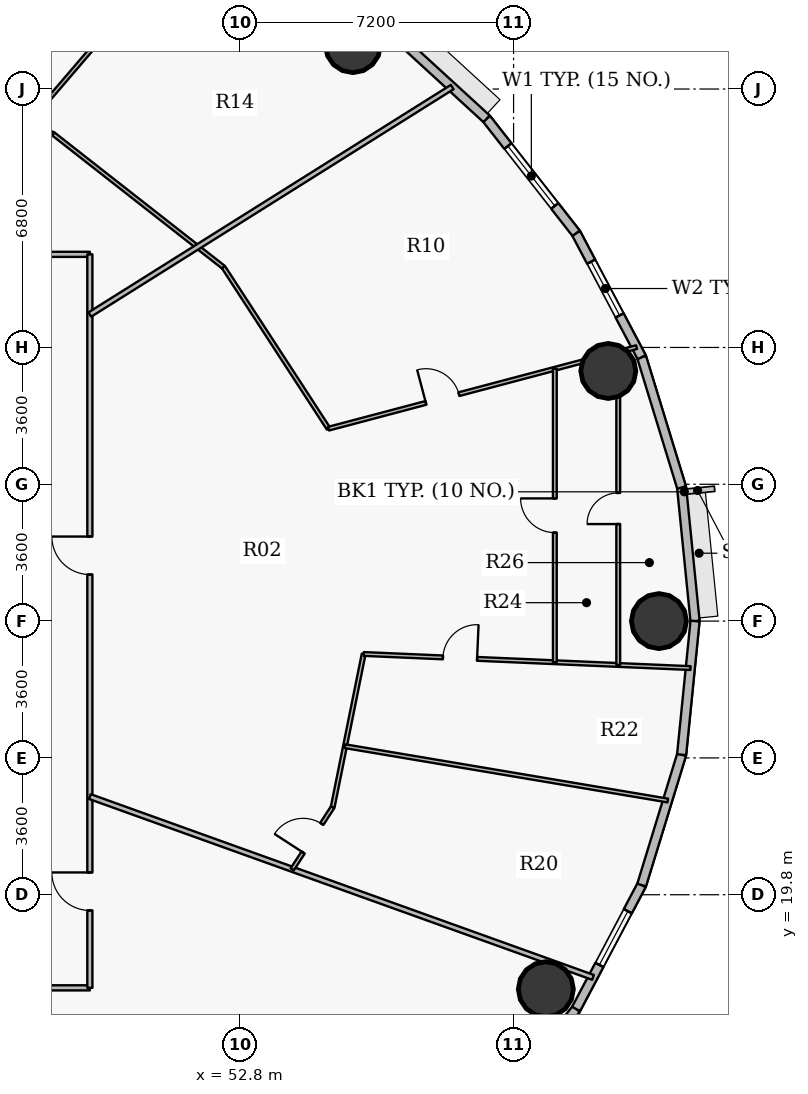
"""IFC4 building model, lengths in metres.
Left out: names, types, materials, properties, quantities, classifications, styles, units other than length and angle.
Written with IfcOpenShell. Run it as: python <this file> out.ifc"""

import sys

from ifc_helpers import new_model, si_unit, direction, frame, frame_2d, origin, origin_2d, place, context, subcontext, project, spatial, rectangle, hollow_circle, extrude, source, transform, mapped, element, fill, save


model = new_model("IFC4")
c1 = context("Model", 3, precision=1e-05, world=origin(), true_north=direction((0.0, 1.0)))
c2 = subcontext(c1, "Body", "Model", "MODEL_VIEW")
j1 = project(units=[si_unit("LENGTHUNIT", "METRE"), si_unit("PLANEANGLEUNIT", "RADIAN")], contexts=[c1])
p1 = place(None, origin())
s1 = spatial("IfcSite", under=j1, at=p1, CompositionType="ELEMENT")
p2 = place(p1, origin())
s2 = spatial("IfcBuilding", under=s1, at=p2, CompositionType="ELEMENT")
p3 = place(p2, frame((0.0, 0.0, 119.7)))
s3 = spatial("IfcBuildingStorey", under=s2, at=p3, CompositionType="ELEMENT", Elevation=119.7)
for number, where, z_axis, x_axis in (
    (1, (63.825, 27.0, 0.0), (0.0, 0.0, 1.0), (1.0, 0.0, 0.0)),
    (2, (62.493, 33.581, 0.0), (0.0, 0.0, 1.0), (1.0, 0.0, 0.0)),
    (3, (55.773, 42.156, 0.0), (0.0, 0.0, 1.0), (1.0, 0.0, 0.0)),
    (4, (60.849, 17.312, 0.0), (0.0, 0.0, 1.0), (1.0, 0.0, 0.0)),
):
    element("IfcColumn", number, at=place(p3, frame(where, z_axis=z_axis, x_axis=x_axis)), inside=s3, PredefinedType="COLUMN", context=c2, shape_type="SweptSolid", body=[
        extrude(hollow_circle(Radius=0.725, WallThickness=0.042, at=origin_2d()), origin(), (0.0, 0.0, 1.0), 3.75),
    ])
p4 = place(p3, frame((64.422, 30.515, 0.0), z_axis=(0.0, 0.0, 1.0), x_axis=(0.099989468229, -0.994988495533, 0.0)))
e5 = element("IfcWall", 5, at=p4, inside=s3, PredefinedType="SOLIDWALL", context=c2, shape_type="SweptSolid", body=[
    extrude(rectangle(XDim=3.533, YDim=0.24, at=frame_2d((1.767, 0.0))), origin(), (0.0, 0.0, 1.0), 3.5),
])
p5 = place(p3, frame((63.37, 33.945, 0.0), z_axis=(0.0, 0.0, 1.0), x_axis=(0.293124431344, -0.956074300329, 0.0)))
e6 = element("IfcWall", 6, at=p5, inside=s3, PredefinedType="SOLIDWALL", context=c2, shape_type="SweptSolid", body=[
    extrude(rectangle(XDim=3.587, YDim=0.24, at=frame_2d((1.793, 0.0))), origin(), (0.0, 0.0, 1.0), 3.5),
])
p6 = place(p3, frame((61.645, 37.206, 0.0), z_axis=(0.0, 0.0, 1.0), x_axis=(0.467614004126, -0.883932770716, 0.0)))
e7 = element("IfcWall", 7, at=p6, inside=s3, PredefinedType="SOLIDWALL", context=c2, shape_type="SweptSolid", body=[
    extrude(rectangle(XDim=3.689, YDim=0.24, at=frame_2d((1.844, 0.0))), origin(), (0.0, 0.0, 1.0), 3.5),
])
p7 = place(p6, frame((0.846, 0.0, 0.9)))
e8 = element("IfcOpeningElement", 8, at=p7, cuts=e7, PredefinedType="OPENING", context=c2, shape_type="SweptSolid", body=[
    extrude(rectangle(XDim=1.6, YDim=1.75, at=origin_2d()), frame((0.8, 0.13, 0.875), z_axis=(0.0, -1.0, 0.0), x_axis=(1.0, 0.0, 0.0)), (0.0, 0.0, 1.0), 0.26),
])
p8 = place(p3, frame((59.289, 40.217, 0.0), z_axis=(0.0, 0.0, 1.0), x_axis=(0.616272103517, -0.787533297345, 0.0)))
e9 = element("IfcWall", 9, at=p8, inside=s3, PredefinedType="SOLIDWALL", context=c2, shape_type="SweptSolid", body=[
    extrude(rectangle(XDim=3.823, YDim=0.24, at=frame_2d((1.912, 0.0))), origin(), (0.0, 0.0, 1.0), 3.5),
])
p9 = place(p8, frame((0.912, 0.0, 0.9)))
e10 = element("IfcOpeningElement", 10, at=p9, cuts=e9, PredefinedType="OPENING", context=c2, shape_type="SweptSolid", body=[
    extrude(rectangle(XDim=2.0, YDim=1.75, at=origin_2d()), frame((1.0, 0.13, 0.875), z_axis=(0.0, -1.0, 0.0), x_axis=(1.0, 0.0, 0.0)), (0.0, 0.0, 1.0), 0.26),
])
p10 = place(p3, frame((56.358, 42.903, 0.0), z_axis=(0.0, 0.0, 1.0), x_axis=(0.737113356241, -0.675769117414, 0.0)))
e11 = element("IfcWall", 11, at=p10, inside=s3, PredefinedType="SOLIDWALL", context=c2, shape_type="SweptSolid", body=[
    extrude(rectangle(XDim=3.976, YDim=0.24, at=frame_2d((1.988, 0.0))), origin(), (0.0, 0.0, 1.0), 3.5),
])
p11 = place(p3, frame((61.645, 16.794, 0.0), z_axis=(0.0, 0.0, 1.0), x_axis=(-0.616272103517, -0.787533297345, 0.0)))
e12 = element("IfcWall", 12, at=p11, inside=s3, PredefinedType="SOLIDWALL", context=c2, shape_type="SweptSolid", body=[
    extrude(rectangle(XDim=3.823, YDim=0.24, at=frame_2d((1.912, 0.0))), origin(), (0.0, 0.0, 1.0), 3.5),
])
p12 = place(p3, frame((63.37, 20.055, 0.0), z_axis=(0.0, 0.0, 1.0), x_axis=(-0.467614004126, -0.883932770716, 0.0)))
e13 = element("IfcWall", 13, at=p12, inside=s3, PredefinedType="SOLIDWALL", context=c2, shape_type="SweptSolid", body=[
    extrude(rectangle(XDim=3.689, YDim=0.24, at=frame_2d((1.844, 0.0))), origin(), (0.0, 0.0, 1.0), 3.5),
])
p13 = place(p12, frame((0.778, 0.0, 0.9)))
e14 = element("IfcOpeningElement", 14, at=p13, cuts=e13, PredefinedType="OPENING", context=c2, shape_type="SweptSolid", body=[
    extrude(rectangle(XDim=1.6, YDim=1.75, at=origin_2d()), frame((0.8, 0.13, 0.875), z_axis=(0.0, -1.0, 0.0), x_axis=(1.0, 0.0, 0.0)), (0.0, 0.0, 1.0), 0.26),
])
p14 = place(p3, frame((64.422, 23.485, 0.0), z_axis=(0.0, 0.0, 1.0), x_axis=(-0.293124431344, -0.956074300329, 0.0)))
e15 = element("IfcWall", 15, at=p14, inside=s3, PredefinedType="SOLIDWALL", context=c2, shape_type="SweptSolid", body=[
    extrude(rectangle(XDim=3.587, YDim=0.24, at=frame_2d((1.793, 0.0))), origin(), (0.0, 0.0, 1.0), 3.5),
])
p15 = place(p3, frame((64.775, 27.0, 0.0), z_axis=(0.0, 0.0, 1.0), x_axis=(-0.099989468229, -0.994988495533, 0.0)))
e16 = element("IfcWall", 16, at=p15, inside=s3, PredefinedType="SOLIDWALL", context=c2, shape_type="SweptSolid", body=[
    extrude(rectangle(XDim=3.533, YDim=0.24, at=frame_2d((1.767, 0.0))), origin(), (0.0, 0.0, 1.0), 3.5),
])
p16 = place(p3, frame((35.584, 17.35, 0.0), z_axis=(0.0, 0.0, 1.0), x_axis=(1.0, 0.0, 0.0)))
e17 = element("IfcWall", 17, at=p16, inside=s3, PredefinedType="PARTITIONING", context=c2, shape_type="SweptSolid", body=[
    extrude(rectangle(XDim=13.266, YDim=0.135, at=frame_2d((6.633, 0.0))), origin(), (0.0, 0.0, 1.0), 2.935),
])
p17 = place(p16, frame((2.757, 0.0, 0.0)))
e18 = element("IfcOpeningElement", 18, at=p17, cuts=e17, PredefinedType="OPENING", context=c2, shape_type="SweptSolid", body=[
    extrude(rectangle(XDim=1.0, YDim=2.15, at=origin_2d()), frame((0.5, 0.078, 1.075), z_axis=(0.0, -1.0, 0.0), x_axis=(1.0, 0.0, 0.0)), (0.0, 0.0, 1.0), 0.155),
])
p18 = place(p3, frame((38.477, 36.65, 0.0), z_axis=(0.0, 0.0, 1.0), x_axis=(1.0, 0.0, 0.0)))
e19 = element("IfcWall", 19, at=p18, inside=s3, PredefinedType="PARTITIONING", context=c2, shape_type="SweptSolid", body=[
    extrude(rectangle(XDim=10.373, YDim=0.135, at=frame_2d((5.187, 0.0))), origin(), (0.0, 0.0, 1.0), 2.935),
])
p19 = place(p18, frame((5.621, 0.0, 0.0)))
e20 = element("IfcOpeningElement", 20, at=p19, cuts=e19, PredefinedType="OPENING", context=c2, shape_type="SweptSolid", body=[
    extrude(rectangle(XDim=1.0, YDim=2.15, at=origin_2d()), frame((0.5, 0.078, 1.075), z_axis=(0.0, -1.0, 0.0), x_axis=(1.0, 0.0, 0.0)), (0.0, 0.0, 1.0), 0.155),
])
p20 = place(p3, frame((42.058, 17.35, 0.0), z_axis=(0.0, 0.0, 1.0), x_axis=(0.531660079213, -0.846957826678, 0.0)))
e21 = element("IfcWall", 21, at=p20, inside=s3, PredefinedType="PARTITIONING", context=c2, shape_type="SweptSolid", body=[
    extrude(rectangle(XDim=12.437, YDim=0.135, at=frame_2d((6.219, 0.0))), origin(), (0.0, 0.0, 1.0), 2.935),
])
p21 = place(p3, frame((47.212, 40.087, 0.0), z_axis=(0.0, 0.0, 1.0), x_axis=(0.928752817467, -0.370699614307, 0.0)))
e22 = element("IfcWall", 22, at=p21, inside=s3, PredefinedType="PARTITIONING", context=c2, shape_type="SweptSolid", body=[
    extrude(rectangle(XDim=0.731, YDim=0.1, at=frame_2d((0.365, 0.0))), origin(), (0.0, 0.0, 1.0), 3.035),
])
p22 = place(p3, frame((47.212, 40.087, 0.0), z_axis=(0.0, 0.0, 1.0), x_axis=(0.650621399292, 0.759402261508, 0.0)))
e23 = element("IfcWall", 23, at=p22, inside=s3, PredefinedType="PARTITIONING", context=c2, shape_type="SweptSolid", body=[
    extrude(rectangle(XDim=7.334, YDim=0.1, at=frame_2d((3.667, 0.0))), origin(), (0.0, 0.0, 1.0), 2.935),
])
p23 = place(p22, frame((3.217, 0.0, 0.0)))
e24 = element("IfcOpeningElement", 24, at=p23, cuts=e23, PredefinedType="OPENING", context=c2, shape_type="SweptSolid", body=[
    extrude(rectangle(XDim=0.9, YDim=2.1, at=origin_2d()), frame((0.45, 0.06, 1.05), z_axis=(0.0, -1.0, 0.0), x_axis=(1.0, 0.0, 0.0)), (0.0, 0.0, 1.0), 0.12),
])
p24 = place(p3, frame((47.891, 39.816, 0.0), z_axis=(0.0, 0.0, 1.0), x_axis=(0.787338202739, -0.616521333376, 0.0)))
e25 = element("IfcWall", 25, at=p24, inside=s3, PredefinedType="PARTITIONING", context=c2, shape_type="SweptSolid", body=[
    extrude(rectangle(XDim=5.684, YDim=0.1, at=frame_2d((2.842, 0.0))), origin(), (0.0, 0.0, 1.0), 2.935),
])
p25 = place(p3, frame((48.85, 17.35, 0.0), z_axis=(0.0, 0.0, 1.0), x_axis=(0.0, 1.0, 0.0)))
e26 = element("IfcWall", 26, at=p25, inside=s3, PredefinedType="PARTITIONING", context=c2, shape_type="SweptSolid", body=[
    extrude(rectangle(XDim=19.3, YDim=0.135, at=frame_2d((9.65, 0.0))), origin(), (0.0, 0.0, 1.0), 2.935),
])
p26 = place(p25, frame((2.036, 0.0, 0.0)))
e27 = element("IfcOpeningElement", 27, at=p26, cuts=e26, PredefinedType="OPENING", context=c2, shape_type="SweptSolid", body=[
    extrude(rectangle(XDim=1.0, YDim=2.15, at=origin_2d()), frame((0.5, 0.078, 1.075), z_axis=(0.0, -1.0, 0.0), x_axis=(1.0, 0.0, 0.0)), (0.0, 0.0, 1.0), 0.155),
])
p27 = place(p25, frame((10.875, 0.0, 0.0)))
e28 = element("IfcOpeningElement", 28, at=p27, cuts=e26, PredefinedType="OPENING", context=c2, shape_type="SweptSolid", body=[
    extrude(rectangle(XDim=1.0, YDim=2.15, at=origin_2d()), frame((0.5, 0.078, 1.075), z_axis=(0.0, -1.0, 0.0), x_axis=(1.0, 0.0, 0.0)), (0.0, 0.0, 1.0), 0.155),
])
p28 = place(p3, frame((48.85, 22.383, 0.0), z_axis=(0.0, 0.0, 1.0), x_axis=(0.941089213164, -0.338158384292, 0.0)))
e29 = element("IfcWall", 29, at=p28, inside=s3, PredefinedType="PARTITIONING", context=c2, shape_type="SweptSolid", body=[
    extrude(rectangle(XDim=14.069, YDim=0.135, at=frame_2d((7.035, 0.0))), origin(), (0.0, 0.0, 1.0), 2.935),
])
p29 = place(p3, frame((48.85, 35.066, 0.0), z_axis=(0.0, 0.0, 1.0), x_axis=(0.846963568038, 0.531650932866, 0.0)))
e30 = element("IfcWall", 30, at=p29, inside=s3, PredefinedType="PARTITIONING", context=c2, shape_type="SweptSolid", body=[
    extrude(rectangle(XDim=11.258, YDim=0.135, at=frame_2d((5.629, 0.0))), origin(), (0.0, 0.0, 1.0), 2.935),
])
p30 = place(p3, frame((52.366, 36.311, 0.0), z_axis=(0.0, 0.0, 1.0), x_axis=(0.545394651961, -0.838179380331, 0.0)))
e31 = element("IfcWall", 31, at=p30, inside=s3, PredefinedType="PARTITIONING", context=c2, shape_type="SweptSolid", body=[
    extrude(rectangle(XDim=5.068, YDim=0.1, at=frame_2d((2.534, 0.0))), origin(), (0.0, 0.0, 1.0), 3.5),
])
p31 = place(p3, frame((54.176, 20.469, 0.0), z_axis=(0.0, 0.0, 1.0), x_axis=(0.545370803514, 0.838194897786, 0.0)))
e32 = element("IfcWall", 32, at=p31, inside=s3, PredefinedType="PARTITIONING", context=c2, shape_type="SweptSolid", body=[
    extrude(rectangle(XDim=1.952, YDim=0.1, at=frame_2d((0.976, 0.0))), origin(), (0.0, 0.0, 1.0), 3.5),
])
p32 = place(p31, frame((0.526, 0.0, 0.0)))
e33 = element("IfcOpeningElement", 33, at=p32, cuts=e32, PredefinedType="OPENING", context=c2, shape_type="SweptSolid", body=[
    extrude(rectangle(XDim=0.9, YDim=2.1, at=origin_2d()), frame((0.45, 0.06, 1.05), z_axis=(0.0, -1.0, 0.0), x_axis=(1.0, 0.0, 0.0)), (0.0, 0.0, 1.0), 0.12),
])
p33 = place(p3, frame((55.131, 32.063, 0.0), z_axis=(0.0, 0.0, 1.0), x_axis=(0.96671793708, 0.255844542893, 0.0)))
e34 = element("IfcWall", 34, at=p33, inside=s3, PredefinedType="PARTITIONING", context=c2, shape_type="SweptSolid", body=[
    extrude(rectangle(XDim=8.385, YDim=0.1, at=frame_2d((4.192, 0.0))), origin(), (0.0, 0.0, 1.0), 2.935),
])
p34 = place(p33, frame((2.65, 0.0, 0.0)))
e35 = element("IfcOpeningElement", 35, at=p34, cuts=e34, PredefinedType="OPENING", context=c2, shape_type="SweptSolid", body=[
    extrude(rectangle(XDim=0.9, YDim=2.1, at=origin_2d()), frame((0.45, 0.06, 1.05), z_axis=(0.0, -1.0, 0.0), x_axis=(1.0, 0.0, 0.0)), (0.0, 0.0, 1.0), 0.12),
])
p35 = place(p3, frame((55.24, 22.105, 0.0), z_axis=(0.0, 0.0, 1.0), x_axis=(0.198205355444, 0.980160515973, 0.0)))
e36 = element("IfcWall", 36, at=p35, inside=s3, PredefinedType="PARTITIONING", context=c2, shape_type="SweptSolid", body=[
    extrude(rectangle(XDim=4.112, YDim=0.1, at=frame_2d((2.056, 0.0))), origin(), (0.0, 0.0, 1.0), 3.5),
])
p36 = place(p3, frame((55.564, 23.708, 0.0), z_axis=(0.0, 0.0, 1.0), x_axis=(0.986139151265, -0.165920385556, 0.0)))
e37 = element("IfcWall", 37, at=p36, inside=s3, PredefinedType="PARTITIONING", context=c2, shape_type="SweptSolid", body=[
    extrude(rectangle(XDim=8.612, YDim=0.1, at=frame_2d((4.306, 0.0))), origin(), (0.0, 0.0, 1.0), 2.935),
])
p37 = place(p3, frame((56.055, 26.135, 0.0), z_axis=(0.0, 0.0, 1.0), x_axis=(0.999070497197, -0.043106166957, 0.0)))
e38 = element("IfcWall", 38, at=p37, inside=s3, PredefinedType="PARTITIONING", context=c2, shape_type="SweptSolid", body=[
    extrude(rectangle(XDim=8.609, YDim=0.1, at=frame_2d((4.304, 0.0))), origin(), (0.0, 0.0, 1.0), 2.935),
])
p38 = place(p37, frame((2.088, 0.0, 0.0)))
e39 = element("IfcOpeningElement", 39, at=p38, cuts=e38, PredefinedType="OPENING", context=c2, shape_type="SweptSolid", body=[
    extrude(rectangle(XDim=0.9, YDim=2.1, at=origin_2d()), frame((0.45, 0.06, 1.05), z_axis=(0.0, -1.0, 0.0), x_axis=(1.0, 0.0, 0.0)), (0.0, 0.0, 1.0), 0.12),
])
p39 = place(p3, frame((61.085, 25.918, 0.0), z_axis=(0.0, 0.0, 1.0), x_axis=(0.0, 1.0, 0.0)))
e40 = element("IfcWall", 40, at=p39, inside=s3, PredefinedType="PARTITIONING", context=c2, shape_type="SweptSolid", body=[
    extrude(rectangle(XDim=7.721, YDim=0.1, at=frame_2d((3.861, 0.0))), origin(), (0.0, 0.0, 1.0), 2.935),
])
p40 = place(p39, frame((3.411, 0.0, 0.0)))
e41 = element("IfcOpeningElement", 41, at=p40, cuts=e40, PredefinedType="OPENING", context=c2, shape_type="SweptSolid", body=[
    extrude(rectangle(XDim=0.9, YDim=2.1, at=origin_2d()), frame((0.45, 0.06, 1.05), z_axis=(0.0, -1.0, 0.0), x_axis=(1.0, 0.0, 0.0)), (0.0, 0.0, 1.0), 0.12),
])
p41 = place(p3, frame((62.754, 25.846, 0.0), z_axis=(0.0, 0.0, 1.0), x_axis=(0.0, 1.0, 0.0)))
e42 = element("IfcWall", 42, at=p41, inside=s3, PredefinedType="PARTITIONING", context=c2, shape_type="SweptSolid", body=[
    extrude(rectangle(XDim=8.235, YDim=0.1, at=frame_2d((4.117, 0.0))), origin(), (0.0, 0.0, 1.0), 2.935),
])
p42 = place(p41, frame((3.708, 0.0, 0.0)))
e43 = element("IfcOpeningElement", 43, at=p42, cuts=e42, PredefinedType="OPENING", context=c2, shape_type="SweptSolid", body=[
    extrude(rectangle(XDim=0.82, YDim=2.1, at=origin_2d()), frame((0.41, 0.06, 1.05), z_axis=(0.0, -1.0, 0.0), x_axis=(1.0, 0.0, 0.0)), (0.0, 0.0, 1.0), 0.12),
])
m1 = source(origin(), c2, "Body", "SweptSolid", [
    extrude(rectangle(XDim=1.6, YDim=1.75, at=origin_2d()), frame((0.8, 0.03, 0.875), z_axis=(0.0, -1.0, 0.0), x_axis=(1.0, 0.0, 0.0)), (0.0, 0.0, 1.0), 0.06),
])
p43 = place(p7, origin())
e44 = element("IfcWindow", 44, at=p43, inside=s3, PartitioningType="DOUBLE_PANEL_VERTICAL", PredefinedType="WINDOW", context=c2, shape_type="MappedRepresentation", body=[
    mapped(m1, transform((0.0, 0.0, 0.0), x_axis=(1.0, 0.0, 0.0), y_axis=(0.0, 1.0, 0.0), z_axis=(0.0, 0.0, 1.0), scale=1.0)),
])
fill(e8, e44)
m2 = source(origin(), c2, "Body", "SweptSolid", [
    extrude(rectangle(XDim=2.0, YDim=1.75, at=origin_2d()), frame((1.0, 0.03, 0.875), z_axis=(0.0, -1.0, 0.0), x_axis=(1.0, 0.0, 0.0)), (0.0, 0.0, 1.0), 0.06),
])
p44 = place(p9, origin())
e45 = element("IfcWindow", 45, at=p44, inside=s3, PartitioningType="DOUBLE_PANEL_VERTICAL", PredefinedType="WINDOW", context=c2, shape_type="MappedRepresentation", body=[
    mapped(m2, transform((0.0, 0.0, 0.0), x_axis=(1.0, 0.0, 0.0), y_axis=(0.0, 1.0, 0.0), z_axis=(0.0, 0.0, 1.0), scale=1.0)),
])
fill(e10, e45)
p45 = place(p13, origin())
e46 = element("IfcWindow", 46, at=p45, inside=s3, PartitioningType="DOUBLE_PANEL_VERTICAL", PredefinedType="WINDOW", context=c2, shape_type="MappedRepresentation", body=[
    mapped(m1, transform((0.0, 0.0, 0.0), x_axis=(1.0, 0.0, 0.0), y_axis=(0.0, 1.0, 0.0), z_axis=(0.0, 0.0, 1.0), scale=1.0)),
])
fill(e14, e46)
m3 = source(origin(), c2, "Body", "SweptSolid", [
    extrude(rectangle(XDim=1.0, YDim=2.15, at=origin_2d()), frame((0.5, 0.025, 1.075), z_axis=(0.0, -1.0, 0.0), x_axis=(1.0, 0.0, 0.0)), (0.0, 0.0, 1.0), 0.05),
])
p46 = place(p26, origin())
e47 = element("IfcDoor", 47, at=p46, inside=s3, OperationType="SINGLE_SWING_RIGHT", PredefinedType="DOOR", context=c2, shape_type="MappedRepresentation", body=[
    mapped(m3, transform((0.0, 0.0, 0.0), x_axis=(1.0, 0.0, 0.0), y_axis=(0.0, 1.0, 0.0), z_axis=(0.0, 0.0, 1.0), scale=1.0)),
])
fill(e27, e47)
p47 = place(p27, origin())
e48 = element("IfcDoor", 48, at=p47, inside=s3, OperationType="SINGLE_SWING_RIGHT", PredefinedType="DOOR", context=c2, shape_type="MappedRepresentation", body=[
    mapped(m3, transform((0.0, 0.0, 0.0), x_axis=(1.0, 0.0, 0.0), y_axis=(0.0, 1.0, 0.0), z_axis=(0.0, 0.0, 1.0), scale=1.0)),
])
fill(e28, e48)
m4 = source(origin(), c2, "Body", "SweptSolid", [
    extrude(rectangle(XDim=0.9, YDim=2.1, at=origin_2d()), frame((0.45, 0.025, 1.05), z_axis=(0.0, -1.0, 0.0), x_axis=(1.0, 0.0, 0.0)), (0.0, 0.0, 1.0), 0.05),
])
p48 = place(p32, origin())
e49 = element("IfcDoor", 49, at=p48, inside=s3, OperationType="SINGLE_SWING_LEFT", PredefinedType="DOOR", context=c2, shape_type="MappedRepresentation", body=[
    mapped(m4, transform((0.0, 0.0, 0.0), x_axis=(1.0, 0.0, 0.0), y_axis=(0.0, 1.0, 0.0), z_axis=(0.0, 0.0, 1.0), scale=1.0)),
])
fill(e33, e49)
p49 = place(p38, origin())
e50 = element("IfcDoor", 50, at=p49, inside=s3, OperationType="SINGLE_SWING_RIGHT", PredefinedType="DOOR", context=c2, shape_type="MappedRepresentation", body=[
    mapped(m4, transform((0.0, 0.0, 0.0), x_axis=(1.0, 0.0, 0.0), y_axis=(0.0, 1.0, 0.0), z_axis=(0.0, 0.0, 1.0), scale=1.0)),
])
fill(e39, e50)
p50 = place(p34, origin())
e51 = element("IfcDoor", 51, at=p50, inside=s3, OperationType="SINGLE_SWING_LEFT", PredefinedType="DOOR", context=c2, shape_type="MappedRepresentation", body=[
    mapped(m4, transform((0.0, 0.0, 0.0), x_axis=(1.0, 0.0, 0.0), y_axis=(0.0, 1.0, 0.0), z_axis=(0.0, 0.0, 1.0), scale=1.0)),
])
fill(e35, e51)
p51 = place(p40, origin())
e52 = element("IfcDoor", 52, at=p51, inside=s3, OperationType="SINGLE_SWING_RIGHT", PredefinedType="DOOR", context=c2, shape_type="MappedRepresentation", body=[
    mapped(m4, transform((0.0, 0.0, 0.0), x_axis=(1.0, 0.0, 0.0), y_axis=(0.0, 1.0, 0.0), z_axis=(0.0, 0.0, 1.0), scale=1.0)),
])
fill(e41, e52)
m5 = source(origin(), c2, "Body", "SweptSolid", [
    extrude(rectangle(XDim=0.82, YDim=2.1, at=origin_2d()), frame((0.41, 0.025, 1.05), z_axis=(0.0, -1.0, 0.0), x_axis=(1.0, 0.0, 0.0)), (0.0, 0.0, 1.0), 0.05),
])
p52 = place(p42, origin())
e53 = element("IfcDoor", 53, at=p52, inside=s3, OperationType="SINGLE_SWING_LEFT", PredefinedType="DOOR", context=c2, shape_type="MappedRepresentation", body=[
    mapped(m5, transform((0.0, 0.0, 0.0), x_axis=(1.0, 0.0, 0.0), y_axis=(0.0, 1.0, 0.0), z_axis=(0.0, 0.0, 1.0), scale=1.0)),
])
fill(e43, e53)
save(model, sys.argv[1])
